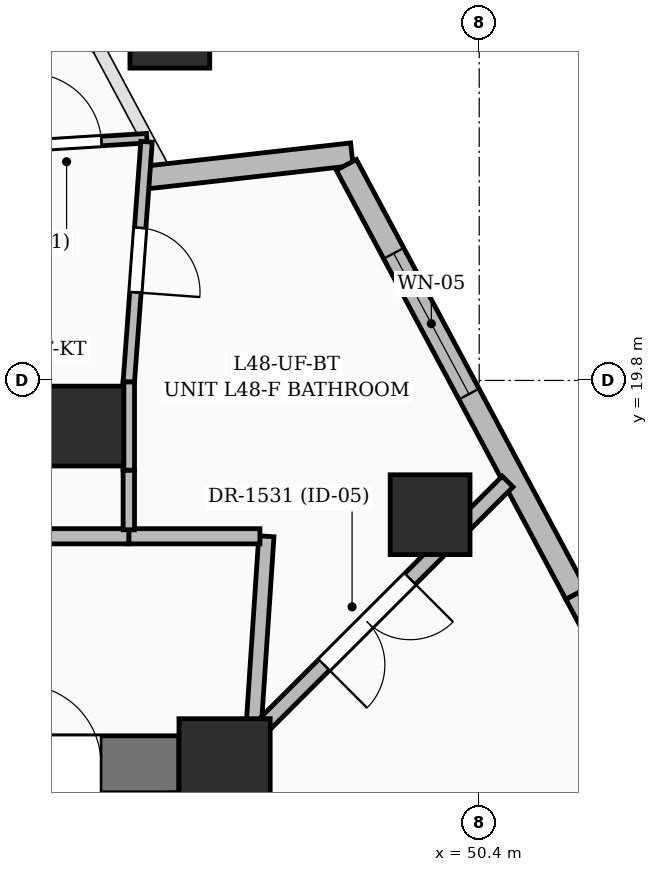
"""IFC4 building model, lengths in metres.
Left out: names, types, materials, properties, quantities, classifications, styles, units other than length and angle.
Written with IfcOpenShell. Run it as: python <this file> out.ifc"""

import sys

from ifc_helpers import new_model, si_unit, direction, frame, frame_2d, origin, origin_2d, place, context, subcontext, project, spatial, rectangle, extrude, element, fill, save


model = new_model("IFC4")
c1 = context("Model", 3, precision=1e-05, world=origin(), true_north=direction((0.0, 1.0)))
c2 = subcontext(c1, "Body", "Model", "MODEL_VIEW")
j1 = project(units=[si_unit("LENGTHUNIT", "METRE"), si_unit("PLANEANGLEUNIT", "RADIAN")], contexts=[c1])
p1 = place(None, origin())
s1 = spatial("IfcSite", under=j1, at=p1, CompositionType="ELEMENT")
p2 = place(p1, origin())
s2 = spatial("IfcBuilding", under=s1, at=p2, CompositionType="ELEMENT")
p3 = place(p2, frame((0.0, 0.0, 186.0)))
s3 = spatial("IfcBuildingStorey", under=s2, at=p3, CompositionType="ELEMENT", Elevation=186.0)
p4 = place(p3, frame((47.05, 14.75, 0.0), z_axis=(0.0, 0.0, 1.0), x_axis=(1.0, 0.0, 0.0)))
e1 = element("IfcColumn", 1, at=p4, inside=s3, PredefinedType="COLUMN", context=c2, shape_type="SweptSolid", body=[
    extrude(rectangle(XDim=1.2, YDim=1.2, at=origin_2d()), origin(), (0.0, 0.0, 1.0), 3.6),
])
p5 = place(p3, frame((45.2, 19.2, 0.0), z_axis=(0.0, 0.0, 1.0), x_axis=(1.0, 0.0, 0.0)))
e2 = element("IfcColumn", 2, at=p5, inside=s3, PredefinedType="COLUMN", context=c2, shape_type="SweptSolid", body=[
    extrude(rectangle(XDim=1.05, YDim=1.05, at=origin_2d()), origin(), (0.0, 0.0, 1.0), 3.6),
])
p6 = place(p3, frame((35.75, 14.75, 0.0), z_axis=(0.0, 0.0, 1.0), x_axis=(1.0, 0.0, 0.0)))
e3 = element("IfcWall", 3, at=p6, inside=s3, PredefinedType="SHEAR", context=c2, shape_type="SweptSolid", body=[
    extrude(rectangle(XDim=10.7, YDim=0.75, at=frame_2d((5.35, 0.0))), origin(), (0.0, 0.0, 1.0), 3.6),
])
p7 = place(p6, frame((1.025, 0.0, 0.0)))
e4 = element("IfcOpeningElement", 4, at=p7, cuts=e3, PredefinedType="OPENING", context=c2, shape_type="SweptSolid", body=[
    extrude(rectangle(XDim=1.05, YDim=2.15, at=frame_2d((0.525, 1.075))), frame((0.0, 0.385, 0.0), z_axis=(0.0, -1.0, 0.0), x_axis=(1.0, 0.0, 0.0)), (0.0, 0.0, 1.0), 0.77),
])
p8 = place(p6, frame((8.625, 0.0, 0.0)))
e5 = element("IfcOpeningElement", 5, at=p8, cuts=e3, PredefinedType="OPENING", context=c2, shape_type="SweptSolid", body=[
    extrude(rectangle(XDim=1.05, YDim=2.15, at=frame_2d((0.525, 1.075))), frame((0.0, 0.385, 0.0), z_axis=(0.0, -1.0, 0.0), x_axis=(1.0, 0.0, 0.0)), (0.0, 0.0, 1.0), 0.77),
])
p9 = place(p3, frame((46.5, 5.2, 0.0), z_axis=(0.0, 0.0, 1.0), x_axis=(0.0, 1.0, 0.0)))
e6 = element("IfcWall", 6, at=p9, inside=s3, PredefinedType="SOLIDWALL", context=c2, shape_type="SweptSolid", body=[
    extrude(rectangle(XDim=9.175, YDim=0.35, at=frame_2d((4.587, 0.0))), origin(), (0.0, 0.0, 1.0), 3.6),
])
for number, where, z_axis, x_axis in (
    (7, (49.754, 18.034, 0.0), (0.0, 0.0, 1.0), (1.0, 0.0, 0.0)),
    (8, (46.33, 24.434, 0.0), (0.0, 0.0, 1.0), (1.0, 0.0, 0.0)),
):
    element("IfcColumn", number, at=place(p3, frame(where, z_axis=z_axis, x_axis=x_axis)), inside=s3, PredefinedType="COLUMN", context=c2, shape_type="SweptSolid", body=[
        extrude(rectangle(XDim=1.05, YDim=1.05, at=origin_2d()), origin(), (0.0, 0.0, 1.0), 3.6),
    ])
p10 = place(p3, frame((46.041, 22.472, 0.0), z_axis=(0.0, 0.0, 1.0), x_axis=(0.993671441146, 0.112325718565, 0.0)))
e9 = element("IfcWall", 9, at=p10, inside=s3, PredefinedType="SOLIDWALL", context=c2, shape_type="SweptSolid", body=[
    extrude(rectangle(XDim=2.702, YDim=0.3, at=frame_2d((1.351, 0.0))), origin(), (0.0, 0.0, 1.0), 2.575),
])
p11 = place(p3, frame((48.652, 22.636, 0.0), z_axis=(0.0, 0.0, 1.0), x_axis=(0.471747381443, -0.881733751254, 0.0)))
e10 = element("IfcWall", 10, at=p11, inside=s3, PredefinedType="SOLIDWALL", context=c2, shape_type="SweptSolid", body=[
    extrude(rectangle(XDim=6.404, YDim=0.3, at=frame_2d((3.202, 0.0))), origin(), (0.0, 0.0, 1.0), 3.35),
])
p12 = place(p11, frame((1.32, 0.0, 0.55)))
e11 = element("IfcOpeningElement", 11, at=p12, cuts=e10, PredefinedType="OPENING", context=c2, shape_type="SweptSolid", body=[
    extrude(rectangle(XDim=2.1, YDim=2.4, at=frame_2d((1.05, 1.2))), frame((0.0, 0.16, 0.0), z_axis=(0.0, -1.0, 0.0), x_axis=(1.0, 0.0, 0.0)), (0.0, 0.0, 1.0), 0.32),
])
p13 = place(p3, frame((51.673, 16.99, 0.0), z_axis=(0.0, 0.0, 1.0), x_axis=(0.471736796599, -0.881739414303, 0.0)))
e12 = element("IfcWall", 12, at=p13, inside=s3, PredefinedType="SOLIDWALL", context=c2, shape_type="SweptSolid", body=[
    extrude(rectangle(XDim=6.683, YDim=0.3, at=frame_2d((3.342, 0.0))), origin(), (0.0, 0.0, 1.0), 3.35),
])
p14 = place(p13, frame((2.375, 0.0, 0.6)))
e13 = element("IfcOpeningElement", 13, at=p14, cuts=e12, PredefinedType="OPENING", context=c2, shape_type="SweptSolid", body=[
    extrude(rectangle(XDim=1.8, YDim=2.1, at=frame_2d((0.9, 1.05))), frame((0.0, 0.16, 0.0), z_axis=(0.0, -1.0, 0.0), x_axis=(1.0, 0.0, 0.0)), (0.0, 0.0, 1.0), 0.32),
])
p15 = place(p3, frame((47.437, 15.305, 0.0), z_axis=(0.0, 0.0, 1.0), x_axis=(0.066545458009, 0.997783394339, 0.0)))
e14 = element("IfcWall", 14, at=p15, inside=s3, PredefinedType="PARTITIONING", context=c2, shape_type="SweptSolid", body=[
    extrude(rectangle(XDim=2.451, YDim=0.2, at=frame_2d((1.225, 0.0))), origin(), (0.0, 0.0, 1.0), 2.464),
])
p16 = place(p3, frame((47.515, 17.75, 0.0), z_axis=(0.0, 0.0, 1.0), x_axis=(-1.0, 0.0, 0.0)))
e15 = element("IfcWall", 15, at=p16, inside=s3, PredefinedType="PARTITIONING", context=c2, shape_type="SweptSolid", body=[
    extrude(rectangle(XDim=1.725, YDim=0.2, at=frame_2d((0.862, 0.0))), origin(), (0.0, 0.0, 1.0), 2.436),
])
p17 = place(p3, frame((45.79, 17.75, 0.0), z_axis=(0.0, 0.0, 1.0), x_axis=(-1.0, 0.0, 0.0)))
e16 = element("IfcWall", 16, at=p17, inside=s3, PredefinedType="PARTITIONING", context=c2, shape_type="SweptSolid", body=[
    extrude(rectangle(XDim=1.68, YDim=0.2, at=frame_2d((0.84, 0.0))), origin(), (0.0, 0.0, 1.0), 2.436),
])
p18 = place(p3, frame((50.774, 18.47, 0.0), z_axis=(0.0, 0.0, 1.0), x_axis=(-0.70755309569, -0.706660184798, 0.0)))
e17 = element("IfcWall", 17, at=p18, inside=s3, PredefinedType="PARTITIONING", context=c2, shape_type="SweptSolid", body=[
    extrude(rectangle(XDim=4.648, YDim=0.2, at=frame_2d((2.324, 0.0))), origin(), (0.0, 0.0, 1.0), 2.464),
])
p19 = place(p18, frame((1.813, 0.0, 0.0)))
e18 = element("IfcOpeningElement", 18, at=p19, cuts=e17, PredefinedType="OPENING", context=c2, shape_type="SweptSolid", body=[
    extrude(rectangle(XDim=1.6, YDim=2.3, at=frame_2d((0.8, 1.15))), frame((0.0, 0.11, 0.0), z_axis=(0.0, -1.0, 0.0), x_axis=(1.0, 0.0, 0.0)), (0.0, 0.0, 1.0), 0.22),
])
p20 = place(p3, frame((44.085, 22.865, 0.0), z_axis=(0.0, 0.0, 1.0), x_axis=(0.998038887388, 0.062596958875, 0.0)))
e19 = element("IfcWall", 19, at=p20, inside=s3, PredefinedType="PARTITIONING", context=c2, shape_type="SweptSolid", body=[
    extrude(rectangle(XDim=1.946, YDim=0.125, at=frame_2d((0.973, 0.0))), origin(), (0.0, 0.0, 1.0), 2.436),
])
p21 = place(p20, frame((0.398, 0.0, 0.0)))
e20 = element("IfcOpeningElement", 20, at=p21, cuts=e19, PredefinedType="OPENING", context=c2, shape_type="SweptSolid", body=[
    extrude(rectangle(XDim=0.95, YDim=2.2, at=frame_2d((0.475, 1.1))), frame((0.0, 0.072, 0.0), z_axis=(0.0, -1.0, 0.0), x_axis=(1.0, 0.0, 0.0)), (0.0, 0.0, 1.0), 0.145),
])
p22 = place(p3, frame((45.79, 18.62, 0.0), z_axis=(0.0, 0.0, 1.0), x_axis=(0.0, -1.0, 0.0)))
e21 = element("IfcWall", 21, at=p22, inside=s3, PredefinedType="PARTITIONING", context=c2, shape_type="SweptSolid", body=[
    extrude(rectangle(XDim=0.785, YDim=0.15, at=frame_2d((0.393, 0.0))), origin(), (0.0, 0.0, 1.0), 2.436),
])
p23 = place(p3, frame((46.023, 22.94, 0.0), z_axis=(0.0, 0.0, 1.0), x_axis=(-0.073667317679, -0.99728287176, 0.0)))
e22 = element("IfcWall", 22, at=p23, inside=s3, PredefinedType="PARTITIONING", context=c2, shape_type="SweptSolid", body=[
    extrude(rectangle(XDim=3.168, YDim=0.15, at=frame_2d((1.584, 0.0))), origin(), (0.0, 0.0, 1.0), 2.464),
])
p24 = place(p23, frame((1.135, 0.0, 0.0)))
e23 = element("IfcOpeningElement", 23, at=p24, cuts=e22, PredefinedType="OPENING", context=c2, shape_type="SweptSolid", body=[
    extrude(rectangle(XDim=0.85, YDim=2.1, at=frame_2d((0.425, 1.05))), frame((0.0, 0.085, 0.0), z_axis=(0.0, -1.0, 0.0), x_axis=(1.0, 0.0, 0.0)), (0.0, 0.0, 1.0), 0.17),
])
p25 = place(p3, frame((45.79, 19.78, 0.0), z_axis=(0.0, 0.0, 1.0), x_axis=(0.0, -1.0, 0.0)))
e24 = element("IfcWall", 24, at=p25, inside=s3, PredefinedType="PARTITIONING", context=c2, shape_type="SweptSolid", body=[
    extrude(rectangle(XDim=1.16, YDim=0.15, at=frame_2d((0.58, 0.0))), origin(), (0.0, 0.0, 1.0), 2.709),
])
p26 = place(p12, origin())
e25 = element("IfcWindow", 25, at=p26, inside=s3, PartitioningType="SINGLE_PANEL", PredefinedType="WINDOW", context=c2, shape_type="SweptSolid", body=[
    extrude(rectangle(XDim=2.1, YDim=2.4, at=frame_2d((1.05, 1.2))), frame((0.0, 0.03, 0.0), z_axis=(0.0, -1.0, 0.0), x_axis=(1.0, 0.0, 0.0)), (0.0, 0.0, 1.0), 0.06),
])
fill(e11, e25)
p27 = place(p8, origin())
e26 = element("IfcDoor", 26, at=p27, inside=s3, OperationType="SINGLE_SWING_LEFT", PredefinedType="DOOR", context=c2, shape_type="SweptSolid", body=[
    extrude(rectangle(XDim=1.05, YDim=2.15, at=frame_2d((0.525, 1.075))), frame((0.0, 0.025, 0.0), z_axis=(0.0, -1.0, 0.0), x_axis=(1.0, 0.0, 0.0)), (0.0, 0.0, 1.0), 0.05),
])
fill(e5, e26)
p28 = place(p21, origin())
e27 = element("IfcDoor", 27, at=p28, inside=s3, OperationType="SINGLE_SWING_LEFT", PredefinedType="DOOR", context=c2, shape_type="SweptSolid", body=[
    extrude(rectangle(XDim=0.95, YDim=2.2, at=frame_2d((0.475, 1.1))), frame((0.0, 0.025, 0.0), z_axis=(0.0, -1.0, 0.0), x_axis=(1.0, 0.0, 0.0)), (0.0, 0.0, 1.0), 0.05),
])
fill(e20, e27)
p29 = place(p24, origin())
e28 = element("IfcDoor", 28, at=p29, inside=s3, OperationType="SINGLE_SWING_RIGHT", PredefinedType="DOOR", context=c2, shape_type="SweptSolid", body=[
    extrude(rectangle(XDim=0.85, YDim=2.1, at=frame_2d((0.425, 1.05))), frame((0.0, 0.025, 0.0), z_axis=(0.0, -1.0, 0.0), x_axis=(1.0, 0.0, 0.0)), (0.0, 0.0, 1.0), 0.05),
])
fill(e23, e28)
p30 = place(p19, origin())
e29 = element("IfcDoor", 29, at=p30, inside=s3, OperationType="DOUBLE_DOOR_SINGLE_SWING", PredefinedType="DOOR", context=c2, shape_type="SweptSolid", body=[
    extrude(rectangle(XDim=1.6, YDim=2.3, at=frame_2d((0.8, 1.15))), frame((0.0, 0.025, 0.0), z_axis=(0.0, -1.0, 0.0), x_axis=(1.0, 0.0, 0.0)), (0.0, 0.0, 1.0), 0.05),
])
fill(e18, e29)
save(model, sys.argv[1])
